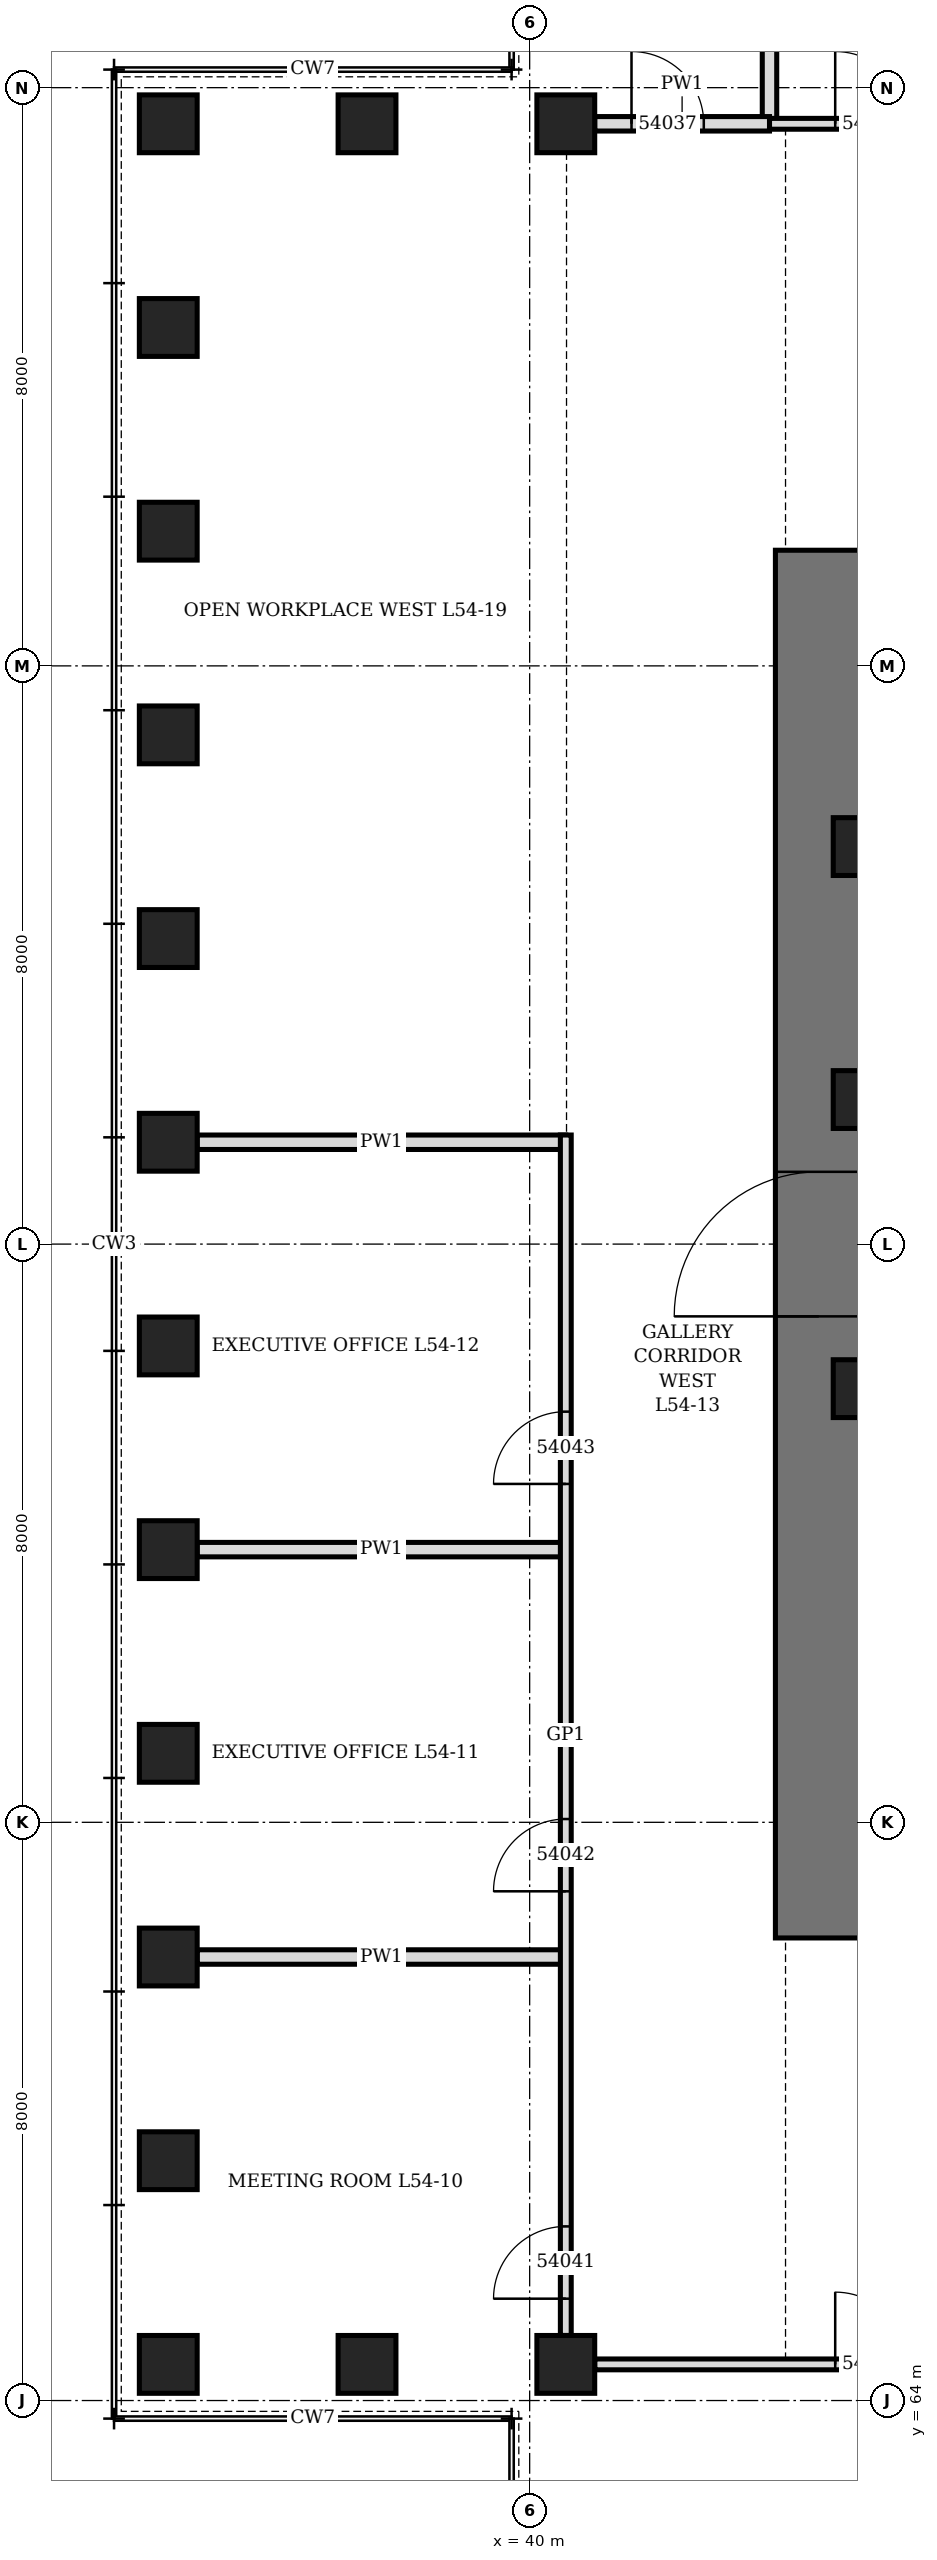
"""IFC4 building model, lengths in metres.
Left out: names, types, materials, properties, quantities, classifications, styles, units other than length and angle.
Written with IfcOpenShell. Run it as: python <this file> out.ifc"""

import sys

from ifc_helpers import new_model, si_unit, direction, frame, frame_2d, origin, origin_2d, place, context, subcontext, project, spatial, rectangle, hollow_rectangle, extrude, element, fill, save


model = new_model("IFC4")
c1 = context("Model", 3, precision=1e-05, world=origin(), true_north=direction((0.0, 1.0)))
c2 = subcontext(c1, "Body", "Model", "MODEL_VIEW")
j1 = project(units=[si_unit("LENGTHUNIT", "METRE"), si_unit("PLANEANGLEUNIT", "RADIAN")], contexts=[c1])
p1 = place(None, origin())
s1 = spatial("IfcSite", under=j1, at=p1, CompositionType="ELEMENT")
p2 = place(p1, origin())
s2 = spatial("IfcBuilding", under=s1, at=p2, CompositionType="ELEMENT")
p3 = place(p2, frame((0.0, 0.0, 240.1)))
s3 = spatial("IfcBuildingStorey", under=s2, at=p3, CompositionType="ELEMENT", Elevation=240.1)
for number, where, z_axis, x_axis in (
    (1, (40.5, 95.5, 0.0), (0.0, 0.0, 1.0), (1.0, 0.0, 0.0)),
    (2, (37.75, 95.5, 0.0), (0.0, 0.0, 1.0), (1.0, 0.0, 0.0)),
    (3, (35.0, 95.5, 0.0), (0.0, 0.0, 1.0), (0.0, 1.0, 0.0)),
    (4, (35.0, 92.682, 0.0), (0.0, 0.0, 1.0), (0.0, 1.0, 0.0)),
    (5, (35.0, 89.864, 0.0), (0.0, 0.0, 1.0), (0.0, 1.0, 0.0)),
    (6, (35.0, 87.045, 0.0), (0.0, 0.0, 1.0), (0.0, 1.0, 0.0)),
    (7, (35.0, 84.227, 0.0), (0.0, 0.0, 1.0), (0.0, 1.0, 0.0)),
    (8, (35.0, 81.409, 0.0), (0.0, 0.0, 1.0), (0.0, 1.0, 0.0)),
    (9, (35.0, 78.591, 0.0), (0.0, 0.0, 1.0), (0.0, 1.0, 0.0)),
    (10, (35.0, 75.773, 0.0), (0.0, 0.0, 1.0), (0.0, 1.0, 0.0)),
    (11, (35.0, 72.955, 0.0), (0.0, 0.0, 1.0), (0.0, 1.0, 0.0)),
    (12, (35.0, 70.136, 0.0), (0.0, 0.0, 1.0), (0.0, 1.0, 0.0)),
    (13, (35.0, 67.318, 0.0), (0.0, 0.0, 1.0), (0.0, 1.0, 0.0)),
    (14, (35.0, 64.5, 0.0), (0.0, 0.0, 1.0), (1.0, 0.0, 0.0)),
    (15, (37.75, 64.5, 0.0), (0.0, 0.0, 1.0), (1.0, 0.0, 0.0)),
    (16, (40.5, 64.5, 0.0), (0.0, 0.0, 1.0), (0.0, 1.0, 0.0)),
):
    element("IfcColumn", number, at=place(p3, frame(where, z_axis=z_axis, x_axis=x_axis)), inside=s3, PredefinedType="COLUMN", context=c2, shape_type="SweptSolid", body=[
        extrude(hollow_rectangle(XDim=0.8, YDim=0.8, WallThickness=0.08, at=origin_2d()), origin(), (0.0, 0.0, 1.0), 4.2),
    ])
p4 = place(p3, frame((44.0, 70.4, 0.0), z_axis=(0.0, 0.0, 1.0), x_axis=(0.0, 1.0, 0.0)))
e17 = element("IfcWall", 17, at=p4, inside=s3, PredefinedType="SHEAR", context=c2, shape_type="SweptSolid", body=[
    extrude(rectangle(XDim=19.2, YDim=1.2, at=frame_2d((9.6, 0.0))), origin(), (0.0, 0.0, 1.0), 4.2),
])
p5 = place(p4, frame((8.6, 0.0, 0.0)))
e18 = element("IfcOpeningElement", 18, at=p5, cuts=e17, PredefinedType="OPENING", context=c2, shape_type="SweptSolid", body=[
    extrude(rectangle(XDim=2.0, YDim=2.4, at=frame_2d((1.0, 1.2))), frame((0.0, 0.61, 0.0), z_axis=(0.0, -1.0, 0.0), x_axis=(1.0, 0.0, 0.0)), (0.0, 0.0, 1.0), 1.22),
])
for number, where, z_axis, x_axis in (
    (19, (44.6, 78.0, 0.0), (0.0, 0.0, 1.0), (1.0, 0.0, 0.0)),
    (20, (44.6, 82.0, 0.0), (0.0, 0.0, 1.0), (1.0, 0.0, 0.0)),
    (21, (44.6, 85.5, 0.0), (0.0, 0.0, 1.0), (1.0, 0.0, 0.0)),
):
    element("IfcColumn", number, at=place(p3, frame(where, z_axis=z_axis, x_axis=x_axis)), inside=s3, PredefinedType="COLUMN", context=c2, shape_type="SweptSolid", body=[
        extrude(hollow_rectangle(XDim=0.8, YDim=0.8, WallThickness=0.1, at=origin_2d()), origin(), (0.0, 0.0, 1.0), 4.2),
    ])
for number, where, z_axis, x_axis in (
    (22, (43.318, 95.5, 0.0), (0.0, 0.0, 1.0), (0.0, 1.0, 0.0)),
    (23, (35.4, 70.136, 0.0), (0.0, 0.0, 1.0), (1.0, 0.0, 0.0)),
    (24, (35.4, 75.773, 0.0), (0.0, 0.0, 1.0), (1.0, 0.0, 0.0)),
    (25, (35.4, 81.409, 0.0), (0.0, 0.0, 1.0), (1.0, 0.0, 0.0)),
):
    element("IfcWall", number, at=place(p3, frame(where, z_axis=z_axis, x_axis=x_axis)), inside=s3, PredefinedType="PARTITIONING", context=c2, shape_type="SweptSolid", body=[
        extrude(rectangle(XDim=5.1, YDim=0.2, at=frame_2d((2.55, 0.0))), origin(), (0.0, 0.0, 1.0), 3.188),
    ])
p6 = place(p3, frame((40.9, 64.5, 0.0), z_axis=(0.0, 0.0, 1.0), x_axis=(1.0, 0.0, 0.0)))
e26 = element("IfcWall", 26, at=p6, inside=s3, PredefinedType="PARTITIONING", context=c2, shape_type="SweptSolid", body=[
    extrude(rectangle(XDim=8.155, YDim=0.15, at=frame_2d((4.077, 0.0))), origin(), (0.0, 0.0, 1.0), 3.95),
])
p7 = place(p6, frame((3.327, 0.0, 0.0)))
e27 = element("IfcOpeningElement", 27, at=p7, cuts=e26, PredefinedType="OPENING", context=c2, shape_type="SweptSolid", body=[
    extrude(rectangle(XDim=1.0, YDim=2.4, at=frame_2d((0.5, 1.2))), frame((0.0, 0.085, 0.0), z_axis=(0.0, -1.0, 0.0), x_axis=(1.0, 0.0, 0.0)), (0.0, 0.0, 1.0), 0.17),
])
p8 = place(p3, frame((43.318, 95.5, 0.0), z_axis=(0.0, 0.0, 1.0), x_axis=(1.0, 0.0, 0.0)))
e28 = element("IfcWall", 28, at=p8, inside=s3, PredefinedType="PARTITIONING", context=c2, shape_type="SweptSolid", body=[
    extrude(rectangle(XDim=8.555, YDim=0.15, at=frame_2d((4.277, 0.0))), origin(), (0.0, 0.0, 1.0), 3.95),
])
p9 = place(p8, frame((0.909, 0.0, 0.0)))
e29 = element("IfcOpeningElement", 29, at=p9, cuts=e28, PredefinedType="OPENING", context=c2, shape_type="SweptSolid", body=[
    extrude(rectangle(XDim=1.0, YDim=2.4, at=frame_2d((0.5, 1.2))), frame((0.0, 0.085, 0.0), z_axis=(0.0, -1.0, 0.0), x_axis=(1.0, 0.0, 0.0)), (0.0, 0.0, 1.0), 0.17),
])
p10 = place(p8, frame((3.727, 0.0, 0.0)))
e30 = element("IfcOpeningElement", 30, at=p10, cuts=e28, PredefinedType="OPENING", context=c2, shape_type="SweptSolid", body=[
    extrude(rectangle(XDim=1.0, YDim=2.4, at=frame_2d((0.5, 1.2))), frame((0.0, 0.085, 0.0), z_axis=(0.0, -1.0, 0.0), x_axis=(1.0, 0.0, 0.0)), (0.0, 0.0, 1.0), 0.17),
])
p11 = place(p8, frame((6.545, 0.0, 0.0)))
e31 = element("IfcOpeningElement", 31, at=p11, cuts=e28, PredefinedType="OPENING", context=c2, shape_type="SweptSolid", body=[
    extrude(rectangle(XDim=1.0, YDim=2.4, at=frame_2d((0.5, 1.2))), frame((0.0, 0.085, 0.0), z_axis=(0.0, -1.0, 0.0), x_axis=(1.0, 0.0, 0.0)), (0.0, 0.0, 1.0), 0.17),
])
p12 = place(p3, frame((40.9, 95.5, 0.0), z_axis=(0.0, 0.0, 1.0), x_axis=(1.0, 0.0, 0.0)))
e32 = element("IfcWall", 32, at=p12, inside=s3, PredefinedType="PARTITIONING", context=c2, shape_type="SweptSolid", body=[
    extrude(rectangle(XDim=2.418, YDim=0.2, at=frame_2d((1.209, 0.0))), origin(), (0.0, 0.0, 1.0), 3.95),
])
p13 = place(p12, frame((0.509, 0.0, 0.0)))
e33 = element("IfcOpeningElement", 33, at=p13, cuts=e32, PredefinedType="OPENING", context=c2, shape_type="SweptSolid", body=[
    extrude(rectangle(XDim=1.0, YDim=2.1, at=frame_2d((0.5, 1.05))), frame((0.0, 0.11, 0.0), z_axis=(0.0, -1.0, 0.0), x_axis=(1.0, 0.0, 0.0)), (0.0, 0.0, 1.0), 0.22),
])
p14 = place(p3, frame((40.5, 64.9, 0.0), z_axis=(0.0, 0.0, 1.0), x_axis=(0.0, 1.0, 0.0)))
e34 = element("IfcWall", 34, at=p14, inside=s3, PredefinedType="PARTITIONING", context=c2, shape_type="SweptSolid", body=[
    extrude(rectangle(XDim=16.609, YDim=0.15, at=frame_2d((8.305, 0.0))), origin(), (0.0, 0.0, 1.0), 3.95),
])
p15 = place(p14, frame((0.509, 0.0, 0.0)))
e35 = element("IfcOpeningElement", 35, at=p15, cuts=e34, PredefinedType="OPENING", context=c2, shape_type="SweptSolid", body=[
    extrude(rectangle(XDim=1.0, YDim=2.4, at=frame_2d((0.5, 1.2))), frame((0.0, 0.085, 0.0), z_axis=(0.0, -1.0, 0.0), x_axis=(1.0, 0.0, 0.0)), (0.0, 0.0, 1.0), 0.17),
])
p16 = place(p14, frame((6.146, 0.0, 0.0)))
e36 = element("IfcOpeningElement", 36, at=p16, cuts=e34, PredefinedType="OPENING", context=c2, shape_type="SweptSolid", body=[
    extrude(rectangle(XDim=1.0, YDim=2.1, at=frame_2d((0.5, 1.05))), frame((0.0, 0.085, 0.0), z_axis=(0.0, -1.0, 0.0), x_axis=(1.0, 0.0, 0.0)), (0.0, 0.0, 1.0), 0.17),
])
p17 = place(p14, frame((11.782, 0.0, 0.0)))
e37 = element("IfcOpeningElement", 37, at=p17, cuts=e34, PredefinedType="OPENING", context=c2, shape_type="SweptSolid", body=[
    extrude(rectangle(XDim=1.0, YDim=2.1, at=frame_2d((0.5, 1.05))), frame((0.0, 0.085, 0.0), z_axis=(0.0, -1.0, 0.0), x_axis=(1.0, 0.0, 0.0)), (0.0, 0.0, 1.0), 0.17),
])
p18 = place(p5, origin())
e38 = element("IfcDoor", 38, at=p18, inside=s3, OperationType="DOUBLE_DOOR_SINGLE_SWING", PredefinedType="DOOR", context=c2, shape_type="SweptSolid", body=[
    extrude(rectangle(XDim=2.0, YDim=2.4, at=frame_2d((1.0, 1.2))), frame((0.0, 0.35, 0.0), z_axis=(0.0, -1.0, 0.0), x_axis=(1.0, 0.0, 0.0)), (0.0, 0.0, 1.0), 0.7),
])
fill(e18, e38)
p19 = place(p7, origin())
e39 = element("IfcDoor", 39, at=p19, inside=s3, OperationType="SINGLE_SWING_RIGHT", PredefinedType="DOOR", context=c2, shape_type="SweptSolid", body=[
    extrude(rectangle(XDim=1.0, YDim=2.4, at=frame_2d((0.5, 1.2))), frame((0.0, 0.075, 0.0), z_axis=(0.0, -1.0, 0.0), x_axis=(1.0, 0.0, 0.0)), (0.0, 0.0, 1.0), 0.149),
])
fill(e27, e39)
p20 = place(p13, origin())
e40 = element("IfcDoor", 40, at=p20, inside=s3, OperationType="SINGLE_SWING_LEFT", PredefinedType="DOOR", context=c2, shape_type="SweptSolid", body=[
    extrude(rectangle(XDim=1.0, YDim=2.1, at=frame_2d((0.5, 1.05))), frame((0.0, 0.1, 0.0), z_axis=(0.0, -1.0, 0.0), x_axis=(1.0, 0.0, 0.0)), (0.0, 0.0, 1.0), 0.199),
])
fill(e33, e40)
p21 = place(p9, origin())
e41 = element("IfcDoor", 41, at=p21, inside=s3, OperationType="SINGLE_SWING_RIGHT", PredefinedType="DOOR", context=c2, shape_type="SweptSolid", body=[
    extrude(rectangle(XDim=1.0, YDim=2.4, at=frame_2d((0.5, 1.2))), frame((0.0, 0.075, 0.0), z_axis=(0.0, -1.0, 0.0), x_axis=(1.0, 0.0, 0.0)), (0.0, 0.0, 1.0), 0.149),
])
fill(e29, e41)
p22 = place(p15, origin())
e42 = element("IfcDoor", 42, at=p22, inside=s3, OperationType="SINGLE_SWING_RIGHT", PredefinedType="DOOR", context=c2, shape_type="SweptSolid", body=[
    extrude(rectangle(XDim=1.0, YDim=2.4, at=frame_2d((0.5, 1.2))), frame((0.0, 0.075, 0.0), z_axis=(0.0, -1.0, 0.0), x_axis=(1.0, 0.0, 0.0)), (0.0, 0.0, 1.0), 0.149),
])
fill(e35, e42)
p23 = place(p16, origin())
e43 = element("IfcDoor", 43, at=p23, inside=s3, OperationType="SINGLE_SWING_LEFT", PredefinedType="DOOR", context=c2, shape_type="SweptSolid", body=[
    extrude(rectangle(XDim=1.0, YDim=2.1, at=frame_2d((0.5, 1.05))), frame((0.0, 0.075, 0.0), z_axis=(0.0, -1.0, 0.0), x_axis=(1.0, 0.0, 0.0)), (0.0, 0.0, 1.0), 0.149),
])
fill(e36, e43)
p24 = place(p17, origin())
e44 = element("IfcDoor", 44, at=p24, inside=s3, OperationType="SINGLE_SWING_LEFT", PredefinedType="DOOR", context=c2, shape_type="SweptSolid", body=[
    extrude(rectangle(XDim=1.0, YDim=2.1, at=frame_2d((0.5, 1.05))), frame((0.0, 0.075, 0.0), z_axis=(0.0, -1.0, 0.0), x_axis=(1.0, 0.0, 0.0)), (0.0, 0.0, 1.0), 0.149),
])
fill(e37, e44)
save(model, sys.argv[1])
